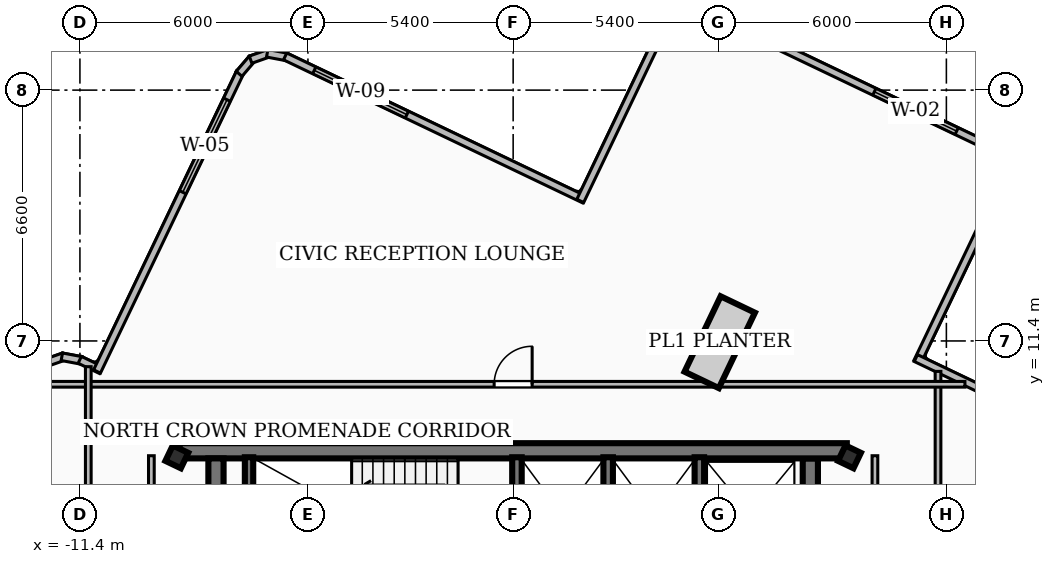
"""IFC4 building model, lengths in metres.
Left out: names, types, materials, properties, quantities, classifications, styles, units other than length and angle.
Written with IfcOpenShell. Run it as: python <this file> out.ifc"""

import sys

from ifc_helpers import new_model, si_unit, direction, frame, frame_2d, origin, origin_2d, place, context, subcontext, project, spatial, rectangle, hollow_rectangle, extrude, element, fill, save


model = new_model("IFC4")
c1 = context("Model", 3, precision=1e-05, world=origin(), true_north=direction((0.0, 1.0)))
c2 = subcontext(c1, "Body", "Model", "MODEL_VIEW")
j1 = project(units=[si_unit("LENGTHUNIT", "METRE"), si_unit("PLANEANGLEUNIT", "RADIAN")], contexts=[c1])
p1 = place(None, origin())
s1 = spatial("IfcSite", under=j1, at=p1, CompositionType="ELEMENT")
p2 = place(p1, origin())
s2 = spatial("IfcBuilding", under=s1, at=p2, CompositionType="ELEMENT")
p3 = place(p2, frame((0.0, 0.0, 293.4)))
s3 = spatial("IfcBuildingStorey", under=s2, at=p3, CompositionType="ELEMENT", Elevation=293.4)
p4 = place(p3, frame((-8.78, 8.51, 0.0), z_axis=(0.0, 0.0, 1.0), x_axis=(1.0, 0.0, 0.0)))
e1 = element("IfcWall", 1, at=p4, inside=s3, PredefinedType="SHEAR", context=c2, shape_type="SweptSolid", body=[
    extrude(rectangle(XDim=17.56, YDim=0.4, at=frame_2d((8.78, 0.0))), origin(), (0.0, 0.0, 1.0), 3.84),
])
for number, where, z_axis, x_axis in (
    (2, (-7.82, 1.95, 0.0), (0.0, 0.0, 1.0), (0.0, 1.0, 0.0)),
    (3, (7.82, 8.31, 0.0), (0.0, 0.0, 1.0), (0.0, -1.0, 0.0)),
):
    element("IfcWall", number, at=place(p3, frame(where, z_axis=z_axis, x_axis=x_axis)), inside=s3, PredefinedType="SHEAR", context=c2, shape_type="SweptSolid", body=[
        extrude(rectangle(XDim=6.36, YDim=0.4, at=frame_2d((3.18, 0.0))), origin(), (0.0, 0.0, 1.0), 3.84),
    ])
p5 = place(p3, frame((-6.95, 5.28, 0.0), z_axis=(0.0, 0.0, 1.0), x_axis=(0.0, 1.0, 0.0)))
e4 = element("IfcWall", 4, at=p5, inside=s3, PredefinedType="SOLIDWALL", context=c2, shape_type="SweptSolid", body=[
    extrude(rectangle(XDim=3.06, YDim=0.22, at=frame_2d((1.53, 0.0))), origin(), (0.0, 0.0, 1.0), 3.84),
])
for number, where, z_axis, x_axis in (
    (5, (0.1, 5.3, 0.0), (0.0, 0.0, 1.0), (0.0, 1.0, 0.0)),
    (6, (2.5, 5.3, 0.0), (0.0, 0.0, 1.0), (0.0, 1.0, 0.0)),
    (7, (4.9, 5.3, 0.0), (0.0, 0.0, 1.0), (0.0, 1.0, 0.0)),
):
    element("IfcWall", number, at=place(p3, frame(where, z_axis=z_axis, x_axis=x_axis)), inside=s3, PredefinedType="SOLIDWALL", context=c2, shape_type="SweptSolid", body=[
        extrude(rectangle(XDim=3.04, YDim=0.25, at=frame_2d((1.52, 0.0))), origin(), (0.0, 0.0, 1.0), 3.84),
    ])
for number, where, z_axis, x_axis in (
    (8, (-8.85, 8.35, 0.0), (0.0, 0.0, 1.0), (0.431, 0.902, 0.0)),
    (9, (8.85, 8.35, 0.0), (0.0, 0.0, 1.0), (0.431, 0.902, 0.0)),
):
    element("IfcColumn", number, at=place(p3, frame(where, z_axis=z_axis, x_axis=x_axis)), inside=s3, PredefinedType="COLUMN", context=c2, shape_type="SweptSolid", body=[
        extrude(hollow_rectangle(XDim=0.45, YDim=0.45, WallThickness=0.022, at=origin_2d()), origin(), (0.0, 0.0, 1.0), 4.14),
    ])
p6 = place(p3, frame((-12.313, 10.817, 0.0), z_axis=(0.0, 0.0, 1.0), x_axis=(0.943836182575, 0.3304137716, 0.0)))
e10 = element("IfcWall", 10, at=p6, inside=s3, PredefinedType="SOLIDWALL", context=c2, shape_type="SweptSolid", body=[
    extrude(rectangle(XDim=0.515, YDim=0.2, at=frame_2d((0.257, 0.0))), origin(), (0.0, 0.0, 1.0), 3.84),
])
p7 = place(p3, frame((-11.876, 10.984, 0.0), z_axis=(0.0, 0.0, 1.0), x_axis=(0.983070163766, -0.183229509397, 0.0)))
e11 = element("IfcWall", 11, at=p7, inside=s3, PredefinedType="SOLIDWALL", context=c2, shape_type="SweptSolid", body=[
    extrude(rectangle(XDim=0.529, YDim=0.2, at=frame_2d((0.265, 0.0))), origin(), (0.0, 0.0, 1.0), 3.84),
])
p8 = place(p3, frame((-11.404, 10.903, 0.0), z_axis=(0.0, 0.0, 1.0), x_axis=(0.901682192305, -0.432399380296, 0.0)))
e12 = element("IfcWall", 12, at=p8, inside=s3, PredefinedType="SOLIDWALL", context=c2, shape_type="SweptSolid", body=[
    extrude(rectangle(XDim=0.622, YDim=0.2, at=frame_2d((0.311, 0.0))), origin(), (0.0, 0.0, 1.0), 3.84),
])
p9 = place(p3, frame((-10.95, 10.597, 0.0), z_axis=(0.0, 0.0, 1.0), x_axis=(0.431502019975, 0.902111970189, 0.0)))
e13 = element("IfcWall", 13, at=p9, inside=s3, PredefinedType="SOLIDWALL", context=c2, shape_type="SweptSolid", body=[
    extrude(rectangle(XDim=8.727, YDim=0.2, at=frame_2d((4.364, 0.0))), origin(), (0.0, 0.0, 1.0), 3.84),
])
p10 = place(p9, frame((5.227, 0.0, 0.85)))
e14 = element("IfcOpeningElement", 14, at=p10, cuts=e13, PredefinedType="OPENING", context=c2, shape_type="SweptSolid", body=[
    extrude(rectangle(XDim=2.7, YDim=1.85, at=frame_2d((1.35, 0.925))), frame((0.0, 0.11, 0.0), z_axis=(0.0, -1.0, 0.0), x_axis=(1.0, 0.0, 0.0)), (0.0, 0.0, 1.0), 0.22),
])
p11 = place(p3, frame((-7.211, 18.428, 0.0), z_axis=(0.0, 0.0, 1.0), x_axis=(0.649988656018, 0.759943910462, 0.0)))
e15 = element("IfcWall", 15, at=p11, inside=s3, PredefinedType="SOLIDWALL", context=c2, shape_type="SweptSolid", body=[
    extrude(rectangle(XDim=0.526, YDim=0.2, at=frame_2d((0.263, 0.0))), origin(), (0.0, 0.0, 1.0), 3.84),
])
p12 = place(p3, frame((-6.909, 18.801, 0.0), z_axis=(0.0, 0.0, 1.0), x_axis=(0.943339872384, 0.331828095813, 0.0)))
e16 = element("IfcWall", 16, at=p12, inside=s3, PredefinedType="SOLIDWALL", context=c2, shape_type="SweptSolid", body=[
    extrude(rectangle(XDim=0.515, YDim=0.2, at=frame_2d((0.258, 0.0))), origin(), (0.0, 0.0, 1.0), 3.84),
])
p13 = place(p3, frame((-6.472, 18.969, 0.0), z_axis=(0.0, 0.0, 1.0), x_axis=(0.982736118113, -0.185012762142, 0.0)))
e17 = element("IfcWall", 17, at=p13, inside=s3, PredefinedType="SOLIDWALL", context=c2, shape_type="SweptSolid", body=[
    extrude(rectangle(XDim=0.529, YDim=0.2, at=frame_2d((0.265, 0.0))), origin(), (0.0, 0.0, 1.0), 3.84),
])
p14 = place(p3, frame((-6.0, 18.887, 0.0), z_axis=(0.0, 0.0, 1.0), x_axis=(0.902155524993, -0.431410951095, 0.0)))
e18 = element("IfcWall", 18, at=p14, inside=s3, PredefinedType="SOLIDWALL", context=c2, shape_type="SweptSolid", body=[
    extrude(rectangle(XDim=8.727, YDim=0.2, at=frame_2d((4.363, 0.0))), origin(), (0.0, 0.0, 1.0), 3.84),
])
p15 = place(p14, frame((0.85, 0.0, 0.85)))
e19 = element("IfcOpeningElement", 19, at=p15, cuts=e18, PredefinedType="OPENING", context=c2, shape_type="SweptSolid", body=[
    extrude(rectangle(XDim=2.7, YDim=1.65, at=frame_2d((1.35, 0.825))), frame((0.0, 0.11, 0.0), z_axis=(0.0, -1.0, 0.0), x_axis=(1.0, 0.0, 0.0)), (0.0, 0.0, 1.0), 0.22),
])
p16 = place(p3, frame((1.766, 15.085, 0.0), z_axis=(0.0, 0.0, 1.0), x_axis=(0.431553161913, 0.902087505979, 0.0)))
e20 = element("IfcWall", 20, at=p16, inside=s3, PredefinedType="SOLIDWALL", context=c2, shape_type="SweptSolid", body=[
    extrude(rectangle(XDim=5.042, YDim=0.2, at=frame_2d((2.521, 0.0))), origin(), (0.0, 0.0, 1.0), 3.84),
])
p17 = place(p3, frame((5.125, 20.051, 0.0), z_axis=(0.0, 0.0, 1.0), x_axis=(0.902156788426, -0.431408309026, 0.0)))
e21 = element("IfcWall", 21, at=p17, inside=s3, PredefinedType="SOLIDWALL", context=c2, shape_type="SweptSolid", body=[
    extrude(rectangle(XDim=8.055, YDim=0.2, at=frame_2d((4.028, 0.0))), origin(), (0.0, 0.0, 1.0), 3.84),
])
p18 = place(p17, frame((4.855, 0.0, 0.85)))
e22 = element("IfcOpeningElement", 22, at=p18, cuts=e21, PredefinedType="OPENING", context=c2, shape_type="SweptSolid", body=[
    extrude(rectangle(XDim=2.4, YDim=2.1, at=frame_2d((1.2, 1.05))), frame((0.0, 0.11, 0.0), z_axis=(0.0, -1.0, 0.0), x_axis=(1.0, 0.0, 0.0)), (0.0, 0.0, 1.0), 0.22),
])
p19 = place(p3, frame((12.81, 15.392, 0.0), z_axis=(0.0, 0.0, 1.0), x_axis=(-0.431517168739, -0.902104724011, 0.0)))
e23 = element("IfcWall", 23, at=p19, inside=s3, PredefinedType="SOLIDWALL", context=c2, shape_type="SweptSolid", body=[
    extrude(rectangle(XDim=5.043, YDim=0.2, at=frame_2d((2.521, 0.0))), origin(), (0.0, 0.0, 1.0), 3.84),
])
p20 = place(p3, frame((10.597, 10.95, 0.0), z_axis=(0.0, 0.0, 1.0), x_axis=(0.902111970189, -0.431502019975, 0.0)))
e24 = element("IfcWall", 24, at=p20, inside=s3, PredefinedType="SOLIDWALL", context=c2, shape_type="SweptSolid", body=[
    extrude(rectangle(XDim=8.727, YDim=0.2, at=frame_2d((4.364, 0.0))), origin(), (0.0, 0.0, 1.0), 3.84),
])
p21 = place(p20, frame((5.227, 0.0, 0.85)))
e25 = element("IfcOpeningElement", 25, at=p21, cuts=e24, PredefinedType="OPENING", context=c2, shape_type="SweptSolid", body=[
    extrude(rectangle(XDim=2.7, YDim=1.65, at=frame_2d((1.35, 0.825))), frame((0.0, 0.11, 0.0), z_axis=(0.0, -1.0, 0.0), x_axis=(1.0, 0.0, 0.0)), (0.0, 0.0, 1.0), 0.22),
])
p22 = place(p3, frame((-9.52, 1.75, 0.0), z_axis=(0.0, 0.0, 1.0), x_axis=(0.0, 1.0, 0.0)))
e26 = element("IfcWall", 26, at=p22, inside=s3, PredefinedType="PARTITIONING", context=c2, shape_type="SweptSolid", body=[
    extrude(rectangle(XDim=6.63, YDim=0.15, at=frame_2d((3.315, 0.0))), origin(), (0.0, 0.0, 1.0), 3.21),
])
p23 = place(p3, frame((9.52, 1.75, 0.0), z_axis=(0.0, 0.0, 1.0), x_axis=(0.0, 1.0, 0.0)))
e27 = element("IfcWall", 27, at=p23, inside=s3, PredefinedType="PARTITIONING", context=c2, shape_type="SweptSolid", body=[
    extrude(rectangle(XDim=6.63, YDim=0.15, at=frame_2d((3.315, 0.0))), origin(), (0.0, 0.0, 1.0), 3.84),
])
p24 = place(p3, frame((11.18, 10.599, 0.0), z_axis=(0.0, 0.0, 1.0), x_axis=(0.0, -1.0, 0.0)))
e28 = element("IfcWall", 28, at=p24, inside=s3, PredefinedType="PARTITIONING", context=c2, shape_type="SweptSolid", body=[
    extrude(rectangle(XDim=21.322, YDim=0.15, at=frame_2d((10.661, 0.0))), origin(), (0.0, 0.0, 1.0), 3.84),
])
p25 = place(p24, frame((10.099, 0.0, 0.0)))
e29 = element("IfcOpeningElement", 29, at=p25, cuts=e28, PredefinedType="OPENING", context=c2, shape_type="SweptSolid", body=[
    extrude(rectangle(XDim=1.0, YDim=2.1, at=frame_2d((0.5, 1.05))), frame((0.0, 0.085, 0.0), z_axis=(0.0, -1.0, 0.0), x_axis=(1.0, 0.0, 0.0)), (0.0, 0.0, 1.0), 0.17),
])
p26 = place(p3, frame((-12.624, 10.26, 0.0), z_axis=(0.0, 0.0, 1.0), x_axis=(1.0, 0.0, 0.0)))
e30 = element("IfcWall", 30, at=p26, inside=s3, PredefinedType="PARTITIONING", context=c2, shape_type="SweptSolid", body=[
    extrude(rectangle(XDim=24.512, YDim=0.15, at=frame_2d((12.256, 0.0))), origin(), (0.0, 0.0, 1.0), 3.21),
])
p27 = place(p26, frame((12.124, 0.0, 0.0)))
e31 = element("IfcOpeningElement", 31, at=p27, cuts=e30, PredefinedType="OPENING", context=c2, shape_type="SweptSolid", body=[
    extrude(rectangle(XDim=1.0, YDim=2.1, at=frame_2d((0.5, 1.05))), frame((0.0, 0.085, 0.0), z_axis=(0.0, -1.0, 0.0), x_axis=(1.0, 0.0, 0.0)), (0.0, 0.0, 1.0), 0.17),
])
p28 = place(p3, frame((-11.18, -10.599, 0.0), z_axis=(0.0, 0.0, 1.0), x_axis=(0.0, 1.0, 0.0)))
e32 = element("IfcWall", 32, at=p28, inside=s3, PredefinedType="PARTITIONING", context=c2, shape_type="SweptSolid", body=[
    extrude(rectangle(XDim=21.322, YDim=0.15, at=frame_2d((10.661, 0.0))), origin(), (0.0, 0.0, 1.0), 3.84),
])
p29 = place(p28, frame((8.499, 0.0, 0.0)))
e33 = element("IfcOpeningElement", 33, at=p29, cuts=e32, PredefinedType="OPENING", context=c2, shape_type="SweptSolid", body=[
    extrude(rectangle(XDim=1.0, YDim=2.1, at=frame_2d((0.5, 1.05))), frame((0.0, 0.085, 0.0), z_axis=(0.0, -1.0, 0.0), x_axis=(1.0, 0.0, 0.0)), (0.0, 0.0, 1.0), 0.17),
])
p30 = place(p10, origin())
e34 = element("IfcWindow", 34, at=p30, inside=s3, PartitioningType="SINGLE_PANEL", PredefinedType="WINDOW", context=c2, shape_type="SweptSolid", body=[
    extrude(rectangle(XDim=2.7, YDim=1.85, at=frame_2d((1.35, 0.925))), frame((0.0, 0.03, 0.0), z_axis=(0.0, -1.0, 0.0), x_axis=(1.0, 0.0, 0.0)), (0.0, 0.0, 1.0), 0.06),
])
fill(e14, e34)
p31 = place(p15, origin())
e35 = element("IfcWindow", 35, at=p31, inside=s3, PartitioningType="SINGLE_PANEL", PredefinedType="WINDOW", context=c2, shape_type="SweptSolid", body=[
    extrude(rectangle(XDim=2.7, YDim=1.65, at=frame_2d((1.35, 0.825))), frame((0.0, 0.03, 0.0), z_axis=(0.0, -1.0, 0.0), x_axis=(1.0, 0.0, 0.0)), (0.0, 0.0, 1.0), 0.06),
])
fill(e19, e35)
p32 = place(p18, origin())
e36 = element("IfcWindow", 36, at=p32, inside=s3, PartitioningType="SINGLE_PANEL", PredefinedType="WINDOW", context=c2, shape_type="SweptSolid", body=[
    extrude(rectangle(XDim=2.4, YDim=2.1, at=frame_2d((1.2, 1.05))), frame((0.0, 0.03, 0.0), z_axis=(0.0, -1.0, 0.0), x_axis=(1.0, 0.0, 0.0)), (0.0, 0.0, 1.0), 0.06),
])
fill(e22, e36)
p33 = place(p27, origin())
e37 = element("IfcDoor", 37, at=p33, inside=s3, OperationType="SINGLE_SWING_RIGHT", PredefinedType="DOOR", context=c2, shape_type="SweptSolid", body=[
    extrude(rectangle(XDim=1.0, YDim=2.1, at=frame_2d((0.5, 1.05))), frame((0.0, 0.025, 0.0), z_axis=(0.0, -1.0, 0.0), x_axis=(1.0, 0.0, 0.0)), (0.0, 0.0, 1.0), 0.05),
])
fill(e31, e37)
save(model, sys.argv[1])
